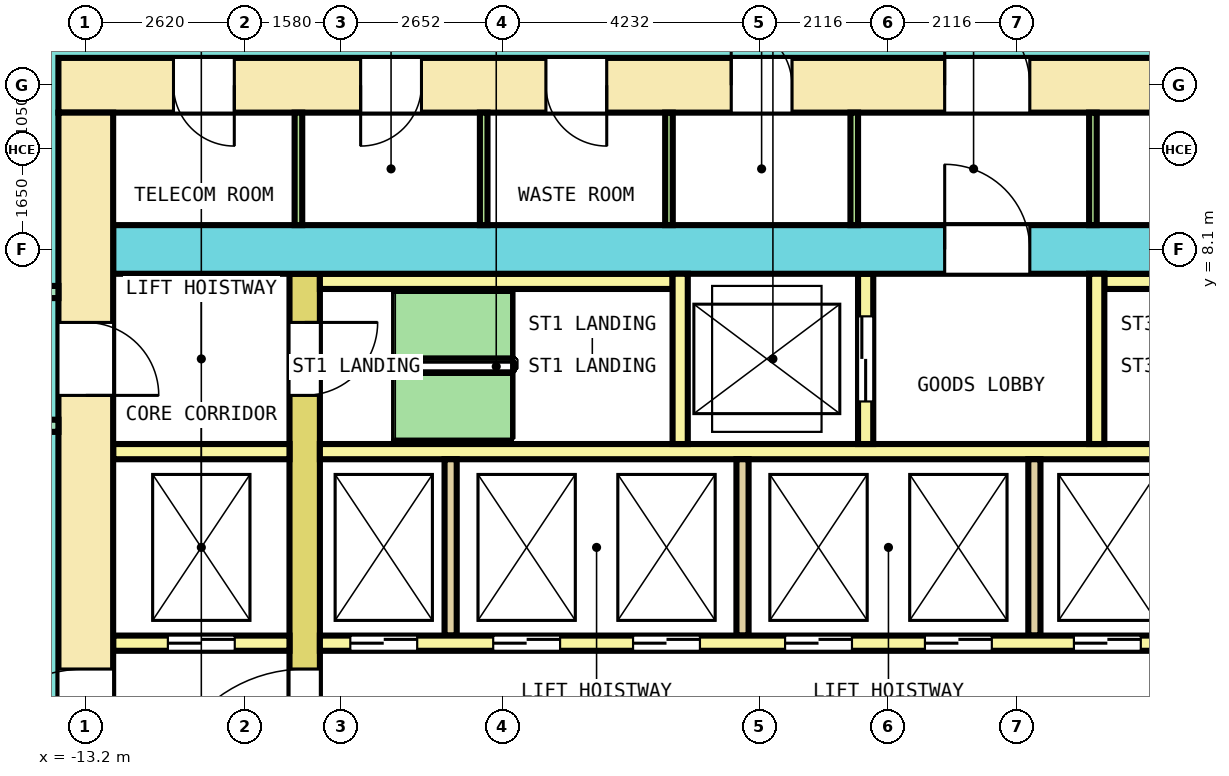
"""IFC4 building model, lengths in metres.
Left out: names, types, materials, properties, quantities, classifications, styles, units other than length and angle.
Written with IfcOpenShell. Run it as: python <this file> out.ifc"""

import sys

from ifc_helpers import new_model, si_unit, direction, frame, frame_2d, origin, place, context, subcontext, project, spatial, rectangle, extrude, element, fill, save


model = new_model("IFC4")
c1 = context("Model", 3, precision=1e-05, world=origin(), true_north=direction((0.0, 1.0)))
c2 = subcontext(c1, "Body", "Model", "MODEL_VIEW")
j1 = project(units=[si_unit("LENGTHUNIT", "METRE"), si_unit("PLANEANGLEUNIT", "RADIAN")], contexts=[c1])
p1 = place(None, origin())
s1 = spatial("IfcSite", under=j1, at=p1, CompositionType="ELEMENT")
p2 = place(p1, origin())
s2 = spatial("IfcBuilding", under=s1, at=p2, CompositionType="ELEMENT")
p3 = place(p2, origin())
s3 = spatial("IfcBuildingStorey", under=s2, at=p3, CompositionType="ELEMENT", Elevation=0.0)
p4 = place(p3, frame((-13.65, 10.8, 0.0), z_axis=(0.0, 0.0, 1.0), x_axis=(1.0, 0.0, 0.0)))
e1 = element("IfcWall", 1, at=p4, inside=s3, PredefinedType="SHEAR", context=c2, shape_type="SweptSolid", body=[
    extrude(rectangle(XDim=27.3, YDim=0.9, at=frame_2d((13.65, 0.0))), origin(), (0.0, 0.0, 1.0), 5.3),
])
p5 = place(p4, frame((1.892, 0.0, 0.0)))
e2 = element("IfcOpeningElement", 2, at=p5, cuts=e1, PredefinedType="OPENING", context=c2, shape_type="SweptSolid", body=[
    extrude(rectangle(XDim=1.0, YDim=2.1, at=frame_2d((0.5, 1.05))), frame((0.0, 0.46, 0.0), z_axis=(0.0, -1.0, 0.0), x_axis=(1.0, 0.0, 0.0)), (0.0, 0.0, 1.0), 0.92),
])
p6 = place(p4, frame((4.97, 0.0, 0.0)))
e3 = element("IfcOpeningElement", 3, at=p6, cuts=e1, PredefinedType="OPENING", context=c2, shape_type="SweptSolid", body=[
    extrude(rectangle(XDim=1.0, YDim=2.1, at=frame_2d((0.5, 1.05))), frame((0.0, 0.46, 0.0), z_axis=(0.0, -1.0, 0.0), x_axis=(1.0, 0.0, 0.0)), (0.0, 0.0, 1.0), 0.92),
])
p7 = place(p4, frame((8.017, 0.0, 0.0)))
e4 = element("IfcOpeningElement", 4, at=p7, cuts=e1, PredefinedType="OPENING", context=c2, shape_type="SweptSolid", body=[
    extrude(rectangle(XDim=1.0, YDim=2.1, at=frame_2d((0.5, 1.05))), frame((0.0, 0.46, 0.0), z_axis=(0.0, -1.0, 0.0), x_axis=(1.0, 0.0, 0.0)), (0.0, 0.0, 1.0), 0.92),
])
p8 = place(p4, frame((11.064, 0.0, 0.0)))
e5 = element("IfcOpeningElement", 5, at=p8, cuts=e1, PredefinedType="OPENING", context=c2, shape_type="SweptSolid", body=[
    extrude(rectangle(XDim=1.0, YDim=2.1, at=frame_2d((0.5, 1.05))), frame((0.0, 0.46, 0.0), z_axis=(0.0, -1.0, 0.0), x_axis=(1.0, 0.0, 0.0)), (0.0, 0.0, 1.0), 0.92),
])
p9 = place(p4, frame((21.238, 0.0, 0.0)))
e6 = element("IfcOpeningElement", 6, at=p9, cuts=e1, PredefinedType="OPENING", context=c2, shape_type="SweptSolid", body=[
    extrude(rectangle(XDim=1.0, YDim=2.1, at=frame_2d((0.5, 1.05))), frame((0.0, 0.46, 0.0), z_axis=(0.0, -1.0, 0.0), x_axis=(1.0, 0.0, 0.0)), (0.0, 0.0, 1.0), 0.92),
])
p10 = place(p4, frame((14.575, 0.0, 0.0)))
e7 = element("IfcOpeningElement", 7, at=p10, cuts=e1, PredefinedType="OPENING", context=c2, shape_type="SweptSolid", body=[
    extrude(rectangle(XDim=1.4, YDim=2.1, at=frame_2d((0.7, 1.05))), frame((0.0, 0.46, 0.0), z_axis=(0.0, -1.0, 0.0), x_axis=(1.0, 0.0, 0.0)), (0.0, 0.0, 1.0), 0.92),
])
p11 = place(p3, frame((-13.2, -10.35, 0.0), z_axis=(0.0, 0.0, 1.0), x_axis=(0.0, 1.0, 0.0)))
e8 = element("IfcWall", 8, at=p11, inside=s3, PredefinedType="SHEAR", context=c2, shape_type="SweptSolid", body=[
    extrude(rectangle(XDim=20.7, YDim=0.9, at=frame_2d((10.35, 0.0))), origin(), (0.0, 0.0, 1.0), 5.3),
])
p12 = place(p11, frame((9.15, 0.0, 0.0)))
e9 = element("IfcOpeningElement", 9, at=p12, cuts=e8, PredefinedType="OPENING", context=c2, shape_type="SweptSolid", body=[
    extrude(rectangle(XDim=2.4, YDim=2.1, at=frame_2d((1.2, 1.05))), frame((0.0, 0.46, 0.0), z_axis=(0.0, -1.0, 0.0), x_axis=(1.0, 0.0, 0.0)), (0.0, 0.0, 1.0), 0.92),
])
p13 = place(p11, frame((16.05, 0.0, 0.0)))
e10 = element("IfcOpeningElement", 10, at=p13, cuts=e8, PredefinedType="OPENING", context=c2, shape_type="SweptSolid", body=[
    extrude(rectangle(XDim=1.2, YDim=2.1, at=frame_2d((0.6, 1.05))), frame((0.0, 0.46, 0.0), z_axis=(0.0, -1.0, 0.0), x_axis=(1.0, 0.0, 0.0)), (0.0, 0.0, 1.0), 0.92),
])
p14 = place(p11, frame((3.45, 0.0, 0.0)))
e11 = element("IfcOpeningElement", 11, at=p14, cuts=e8, PredefinedType="OPENING", context=c2, shape_type="SweptSolid", body=[
    extrude(rectangle(XDim=1.2, YDim=2.1, at=frame_2d((0.6, 1.05))), frame((0.0, 0.46, 0.0), z_axis=(0.0, -1.0, 0.0), x_axis=(1.0, 0.0, 0.0)), (0.0, 0.0, 1.0), 0.92),
])
p15 = place(p3, frame((-12.75, 8.1, 0.0), z_axis=(0.0, 0.0, 1.0), x_axis=(1.0, 0.0, 0.0)))
e12 = element("IfcWall", 12, at=p15, inside=s3, PredefinedType="SHEAR", context=c2, shape_type="SweptSolid", body=[
    extrude(rectangle(XDim=25.5, YDim=0.8, at=frame_2d((12.75, 0.0))), origin(), (0.0, 0.0, 1.0), 5.3),
])
p16 = place(p15, frame((13.675, 0.0, 0.0)))
e13 = element("IfcOpeningElement", 13, at=p16, cuts=e12, PredefinedType="OPENING", context=c2, shape_type="SweptSolid", body=[
    extrude(rectangle(XDim=1.4, YDim=2.1, at=frame_2d((0.7, 1.05))), frame((0.0, 0.41, 0.0), z_axis=(0.0, -1.0, 0.0), x_axis=(1.0, 0.0, 0.0)), (0.0, 0.0, 1.0), 0.82),
])
p17 = place(p3, frame((-9.6, -7.7, 0.0), z_axis=(0.0, 0.0, 1.0), x_axis=(0.0, 1.0, 0.0)))
e14 = element("IfcWall", 14, at=p17, inside=s3, PredefinedType="SHEAR", context=c2, shape_type="SweptSolid", body=[
    extrude(rectangle(XDim=15.4, YDim=0.5, at=frame_2d((7.7, 0.0))), origin(), (0.0, 0.0, 1.0), 5.3),
])
p18 = place(p17, frame((6.5, 0.0, 0.0)))
e15 = element("IfcOpeningElement", 15, at=p18, cuts=e14, PredefinedType="OPENING", context=c2, shape_type="SweptSolid", body=[
    extrude(rectangle(XDim=2.4, YDim=2.1, at=frame_2d((1.2, 1.05))), frame((0.0, 0.26, 0.0), z_axis=(0.0, -1.0, 0.0), x_axis=(1.0, 0.0, 0.0)), (0.0, 0.0, 1.0), 0.52),
])
p19 = place(p17, frame((13.4, 0.0, 0.0)))
e16 = element("IfcOpeningElement", 16, at=p19, cuts=e14, PredefinedType="OPENING", context=c2, shape_type="SweptSolid", body=[
    extrude(rectangle(XDim=1.2, YDim=2.1, at=frame_2d((0.6, 1.05))), frame((0.0, 0.26, 0.0), z_axis=(0.0, -1.0, 0.0), x_axis=(1.0, 0.0, 0.0)), (0.0, 0.0, 1.0), 0.52),
])
p20 = place(p17, frame((0.8, 0.0, 0.0)))
e17 = element("IfcOpeningElement", 17, at=p20, cuts=e14, PredefinedType="OPENING", context=c2, shape_type="SweptSolid", body=[
    extrude(rectangle(XDim=1.2, YDim=2.1, at=frame_2d((0.6, 1.05))), frame((0.0, 0.26, 0.0), z_axis=(0.0, -1.0, 0.0), x_axis=(1.0, 0.0, 0.0)), (0.0, 0.0, 1.0), 0.52),
])
p21 = place(p3, frame((-12.75, 1.625, 0.0), z_axis=(0.0, 0.0, 1.0), x_axis=(1.0, 0.0, 0.0)))
e18 = element("IfcWall", 18, at=p21, inside=s3, PredefinedType="SOLIDWALL", context=c2, shape_type="SweptSolid", body=[
    extrude(rectangle(XDim=2.9, YDim=0.25, at=frame_2d((1.45, 0.0))), origin(), (0.0, 0.0, 1.0), 5.3),
])
p22 = place(p21, frame((0.9, 0.0, 0.0)))
e19 = element("IfcOpeningElement", 19, at=p22, cuts=e18, PredefinedType="OPENING", context=c2, shape_type="SweptSolid", body=[
    extrude(rectangle(XDim=1.1, YDim=2.1, at=frame_2d((0.55, 1.05))), frame((0.0, 0.135, 0.0), z_axis=(0.0, -1.0, 0.0), x_axis=(1.0, 0.0, 0.0)), (0.0, 0.0, 1.0), 0.27),
])
p23 = place(p3, frame((-9.35, 1.625, 0.0), z_axis=(0.0, 0.0, 1.0), x_axis=(1.0, 0.0, 0.0)))
e20 = element("IfcWall", 20, at=p23, inside=s3, PredefinedType="SOLIDWALL", context=c2, shape_type="SweptSolid", body=[
    extrude(rectangle(XDim=18.7, YDim=0.25, at=frame_2d((9.35, 0.0))), origin(), (0.0, 0.0, 1.0), 5.3),
])
p24 = place(p23, frame((0.5, 0.0, 0.0)))
e21 = element("IfcOpeningElement", 21, at=p24, cuts=e20, PredefinedType="OPENING", context=c2, shape_type="SweptSolid", body=[
    extrude(rectangle(XDim=1.1, YDim=2.1, at=frame_2d((0.55, 1.05))), frame((0.0, 0.135, 0.0), z_axis=(0.0, -1.0, 0.0), x_axis=(1.0, 0.0, 0.0)), (0.0, 0.0, 1.0), 0.27),
])
p25 = place(p23, frame((2.85, 0.0, 0.0)))
e22 = element("IfcOpeningElement", 22, at=p25, cuts=e20, PredefinedType="OPENING", context=c2, shape_type="SweptSolid", body=[
    extrude(rectangle(XDim=1.1, YDim=2.1, at=frame_2d((0.55, 1.05))), frame((0.0, 0.135, 0.0), z_axis=(0.0, -1.0, 0.0), x_axis=(1.0, 0.0, 0.0)), (0.0, 0.0, 1.0), 0.27),
])
p26 = place(p23, frame((5.15, 0.0, 0.0)))
e23 = element("IfcOpeningElement", 23, at=p26, cuts=e20, PredefinedType="OPENING", context=c2, shape_type="SweptSolid", body=[
    extrude(rectangle(XDim=1.1, YDim=2.1, at=frame_2d((0.55, 1.05))), frame((0.0, 0.135, 0.0), z_axis=(0.0, -1.0, 0.0), x_axis=(1.0, 0.0, 0.0)), (0.0, 0.0, 1.0), 0.27),
])
p27 = place(p23, frame((7.65, 0.0, 0.0)))
e24 = element("IfcOpeningElement", 24, at=p27, cuts=e20, PredefinedType="OPENING", context=c2, shape_type="SweptSolid", body=[
    extrude(rectangle(XDim=1.1, YDim=2.1, at=frame_2d((0.55, 1.05))), frame((0.0, 0.135, 0.0), z_axis=(0.0, -1.0, 0.0), x_axis=(1.0, 0.0, 0.0)), (0.0, 0.0, 1.0), 0.27),
])
p28 = place(p23, frame((9.95, 0.0, 0.0)))
e25 = element("IfcOpeningElement", 25, at=p28, cuts=e20, PredefinedType="OPENING", context=c2, shape_type="SweptSolid", body=[
    extrude(rectangle(XDim=1.1, YDim=2.1, at=frame_2d((0.55, 1.05))), frame((0.0, 0.135, 0.0), z_axis=(0.0, -1.0, 0.0), x_axis=(1.0, 0.0, 0.0)), (0.0, 0.0, 1.0), 0.27),
])
p29 = place(p23, frame((12.4, 0.0, 0.0)))
e26 = element("IfcOpeningElement", 26, at=p29, cuts=e20, PredefinedType="OPENING", context=c2, shape_type="SweptSolid", body=[
    extrude(rectangle(XDim=1.1, YDim=2.1, at=frame_2d((0.55, 1.05))), frame((0.0, 0.135, 0.0), z_axis=(0.0, -1.0, 0.0), x_axis=(1.0, 0.0, 0.0)), (0.0, 0.0, 1.0), 0.27),
])
p30 = place(p23, frame((14.8, 0.0, 0.0)))
e27 = element("IfcOpeningElement", 27, at=p30, cuts=e20, PredefinedType="OPENING", context=c2, shape_type="SweptSolid", body=[
    extrude(rectangle(XDim=1.1, YDim=2.1, at=frame_2d((0.55, 1.05))), frame((0.0, 0.135, 0.0), z_axis=(0.0, -1.0, 0.0), x_axis=(1.0, 0.0, 0.0)), (0.0, 0.0, 1.0), 0.27),
])
p31 = place(p23, frame((17.1, 0.0, 0.0)))
e28 = element("IfcOpeningElement", 28, at=p31, cuts=e20, PredefinedType="OPENING", context=c2, shape_type="SweptSolid", body=[
    extrude(rectangle(XDim=1.1, YDim=2.1, at=frame_2d((0.55, 1.05))), frame((0.0, 0.135, 0.0), z_axis=(0.0, -1.0, 0.0), x_axis=(1.0, 0.0, 0.0)), (0.0, 0.0, 1.0), 0.27),
])
p32 = place(p3, frame((-12.75, 4.775, 0.0), z_axis=(0.0, 0.0, 1.0), x_axis=(1.0, 0.0, 0.0)))
e29 = element("IfcWall", 29, at=p32, inside=s3, PredefinedType="SOLIDWALL", context=c2, shape_type="SweptSolid", body=[
    extrude(rectangle(XDim=2.9, YDim=0.25, at=frame_2d((1.45, 0.0))), origin(), (0.0, 0.0, 1.0), 5.3),
])
p33 = place(p3, frame((-9.35, 4.775, 0.0), z_axis=(0.0, 0.0, 1.0), x_axis=(1.0, 0.0, 0.0)))
e30 = element("IfcWall", 30, at=p33, inside=s3, PredefinedType="SOLIDWALL", context=c2, shape_type="SweptSolid", body=[
    extrude(rectangle(XDim=18.7, YDim=0.25, at=frame_2d((9.35, 0.0))), origin(), (0.0, 0.0, 1.0), 5.3),
])
for number, where, z_axis, x_axis in (
    (31, (-7.2, 1.75, 0.0), (0.0, 0.0, 1.0), (0.0, 1.0, 0.0)),
    (32, (-2.4, 1.75, 0.0), (0.0, 0.0, 1.0), (0.0, 1.0, 0.0)),
    (33, (2.4, 1.75, 0.0), (0.0, 0.0, 1.0), (0.0, 1.0, 0.0)),
):
    element("IfcWall", number, at=place(p3, frame(where, z_axis=z_axis, x_axis=x_axis)), inside=s3, PredefinedType="SOLIDWALL", context=c2, shape_type="SweptSolid", body=[
        extrude(rectangle(XDim=2.9, YDim=0.2, at=frame_2d((1.45, 0.0))), origin(), (0.0, 0.0, 1.0), 5.3),
    ])
for number, where, z_axis, x_axis in (
    (34, (-9.35, 7.575, 0.0), (0.0, 0.0, 1.0), (1.0, 0.0, 0.0)),
    (35, (3.55, 7.575, 0.0), (0.0, 0.0, 1.0), (1.0, 0.0, 0.0)),
):
    element("IfcWall", number, at=place(p3, frame(where, z_axis=z_axis, x_axis=x_axis)), inside=s3, PredefinedType="SOLIDWALL", context=c2, shape_type="SweptSolid", body=[
        extrude(rectangle(XDim=5.8, YDim=0.25, at=frame_2d((2.9, 0.0))), origin(), (0.0, 0.0, 1.0), 5.3),
    ])
p34 = place(p3, frame((-3.425, 4.9, 0.0), z_axis=(0.0, 0.0, 1.0), x_axis=(0.0, 1.0, 0.0)))
e36 = element("IfcWall", 36, at=p34, inside=s3, PredefinedType="SOLIDWALL", context=c2, shape_type="SweptSolid", body=[
    extrude(rectangle(XDim=2.8, YDim=0.25, at=frame_2d((1.4, 0.0))), origin(), (0.0, 0.0, 1.0), 5.3),
])
p35 = place(p3, frame((-0.375, 4.9, 0.0), z_axis=(0.0, 0.0, 1.0), x_axis=(0.0, 1.0, 0.0)))
e37 = element("IfcWall", 37, at=p35, inside=s3, PredefinedType="SOLIDWALL", context=c2, shape_type="SweptSolid", body=[
    extrude(rectangle(XDim=2.8, YDim=0.25, at=frame_2d((1.4, 0.0))), origin(), (0.0, 0.0, 1.0), 5.3),
])
p36 = place(p35, frame((0.7, 0.0, 0.0)))
e38 = element("IfcOpeningElement", 38, at=p36, cuts=e37, PredefinedType="OPENING", context=c2, shape_type="SweptSolid", body=[
    extrude(rectangle(XDim=1.4, YDim=2.1, at=frame_2d((0.7, 1.05))), frame((0.0, 0.135, 0.0), z_axis=(0.0, -1.0, 0.0), x_axis=(1.0, 0.0, 0.0)), (0.0, 0.0, 1.0), 0.27),
])
p37 = place(p3, frame((3.425, 4.9, 0.0), z_axis=(0.0, 0.0, 1.0), x_axis=(0.0, 1.0, 0.0)))
e39 = element("IfcWall", 39, at=p37, inside=s3, PredefinedType="SOLIDWALL", context=c2, shape_type="SweptSolid", body=[
    extrude(rectangle(XDim=2.8, YDim=0.25, at=frame_2d((1.4, 0.0))), origin(), (0.0, 0.0, 1.0), 5.3),
])
for number, where, z_axis, x_axis in (
    (40, (-9.703, 8.5, 0.0), (0.0, 0.0, 1.0), (0.0, 1.0, 0.0)),
    (41, (-6.656, 8.5, 0.0), (0.0, 0.0, 1.0), (0.0, 1.0, 0.0)),
    (42, (-3.609, 8.5, 0.0), (0.0, 0.0, 1.0), (0.0, 1.0, 0.0)),
    (43, (-0.562, 8.5, 0.0), (0.0, 0.0, 1.0), (0.0, 1.0, 0.0)),
    (44, (3.363, 8.5, 0.0), (0.0, 0.0, 1.0), (0.0, 1.0, 0.0)),
):
    element("IfcWall", number, at=place(p3, frame(where, z_axis=z_axis, x_axis=x_axis)), inside=s3, PredefinedType="PARTITIONING", context=c2, shape_type="SweptSolid", body=[
        extrude(rectangle(XDim=1.85, YDim=0.125, at=frame_2d((0.925, 0.0))), origin(), (0.0, 0.0, 1.0), 5.3),
    ])
p38 = place(p3, frame((-17.727, 7.4, 0.0), z_axis=(0.0, 0.0, 1.0), x_axis=(1.0, 0.0, 0.0)))
e45 = element("IfcWall", 45, at=p38, inside=s3, PredefinedType="PARTITIONING", context=c2, shape_type="SweptSolid", body=[
    extrude(rectangle(XDim=4.077, YDim=0.2, at=frame_2d((2.038, 0.0))), origin(), (0.0, 0.0, 1.0), 4.2),
])
p39 = place(p38, frame((1.977, 0.0, 0.0)))
e46 = element("IfcOpeningElement", 46, at=p39, cuts=e45, PredefinedType="OPENING", context=c2, shape_type="SweptSolid", body=[
    extrude(rectangle(XDim=1.2, YDim=2.1, at=frame_2d((0.6, 1.05))), frame((0.0, 0.11, 0.0), z_axis=(0.0, -1.0, 0.0), x_axis=(1.0, 0.0, 0.0)), (0.0, 0.0, 1.0), 0.22),
])
p40 = place(p3, frame((-16.873, 5.2, 0.0), z_axis=(0.0, 0.0, 1.0), x_axis=(1.0, 0.0, 0.0)))
e47 = element("IfcWall", 47, at=p40, inside=s3, PredefinedType="PARTITIONING", context=c2, shape_type="SweptSolid", body=[
    extrude(rectangle(XDim=3.223, YDim=0.2, at=frame_2d((1.612, 0.0))), origin(), (0.0, 0.0, 1.0), 4.2),
])
p41 = place(p22, origin())
e48 = element("IfcDoor", 48, at=p41, inside=s3, OperationType="DOUBLE_DOOR_SLIDING", PredefinedType="DOOR", context=c2, shape_type="SweptSolid", body=[
    extrude(rectangle(XDim=1.1, YDim=2.1, at=frame_2d((0.55, 1.05))), frame((0.0, 0.075, 0.0), z_axis=(0.0, -1.0, 0.0), x_axis=(1.0, 0.0, 0.0)), (0.0, 0.0, 1.0), 0.15),
])
fill(e19, e48)
p42 = place(p24, origin())
e49 = element("IfcDoor", 49, at=p42, inside=s3, OperationType="DOUBLE_DOOR_SLIDING", PredefinedType="DOOR", context=c2, shape_type="SweptSolid", body=[
    extrude(rectangle(XDim=1.1, YDim=2.1, at=frame_2d((0.55, 1.05))), frame((0.0, 0.075, 0.0), z_axis=(0.0, -1.0, 0.0), x_axis=(1.0, 0.0, 0.0)), (0.0, 0.0, 1.0), 0.15),
])
fill(e21, e49)
p43 = place(p25, origin())
e50 = element("IfcDoor", 50, at=p43, inside=s3, OperationType="DOUBLE_DOOR_SLIDING", PredefinedType="DOOR", context=c2, shape_type="SweptSolid", body=[
    extrude(rectangle(XDim=1.1, YDim=2.1, at=frame_2d((0.55, 1.05))), frame((0.0, 0.075, 0.0), z_axis=(0.0, -1.0, 0.0), x_axis=(1.0, 0.0, 0.0)), (0.0, 0.0, 1.0), 0.15),
])
fill(e22, e50)
p44 = place(p26, origin())
e51 = element("IfcDoor", 51, at=p44, inside=s3, OperationType="DOUBLE_DOOR_SLIDING", PredefinedType="DOOR", context=c2, shape_type="SweptSolid", body=[
    extrude(rectangle(XDim=1.1, YDim=2.1, at=frame_2d((0.55, 1.05))), frame((0.0, 0.075, 0.0), z_axis=(0.0, -1.0, 0.0), x_axis=(1.0, 0.0, 0.0)), (0.0, 0.0, 1.0), 0.15),
])
fill(e23, e51)
p45 = place(p27, origin())
e52 = element("IfcDoor", 52, at=p45, inside=s3, OperationType="DOUBLE_DOOR_SLIDING", PredefinedType="DOOR", context=c2, shape_type="SweptSolid", body=[
    extrude(rectangle(XDim=1.1, YDim=2.1, at=frame_2d((0.55, 1.05))), frame((0.0, 0.075, 0.0), z_axis=(0.0, -1.0, 0.0), x_axis=(1.0, 0.0, 0.0)), (0.0, 0.0, 1.0), 0.15),
])
fill(e24, e52)
p46 = place(p28, origin())
e53 = element("IfcDoor", 53, at=p46, inside=s3, OperationType="DOUBLE_DOOR_SLIDING", PredefinedType="DOOR", context=c2, shape_type="SweptSolid", body=[
    extrude(rectangle(XDim=1.1, YDim=2.1, at=frame_2d((0.55, 1.05))), frame((0.0, 0.075, 0.0), z_axis=(0.0, -1.0, 0.0), x_axis=(1.0, 0.0, 0.0)), (0.0, 0.0, 1.0), 0.15),
])
fill(e25, e53)
p47 = place(p29, origin())
e54 = element("IfcDoor", 54, at=p47, inside=s3, OperationType="DOUBLE_DOOR_SLIDING", PredefinedType="DOOR", context=c2, shape_type="SweptSolid", body=[
    extrude(rectangle(XDim=1.1, YDim=2.1, at=frame_2d((0.55, 1.05))), frame((0.0, 0.075, 0.0), z_axis=(0.0, -1.0, 0.0), x_axis=(1.0, 0.0, 0.0)), (0.0, 0.0, 1.0), 0.15),
])
fill(e26, e54)
p48 = place(p36, origin())
e55 = element("IfcDoor", 55, at=p48, inside=s3, OperationType="DOUBLE_DOOR_SLIDING", PredefinedType="DOOR", context=c2, shape_type="SweptSolid", body=[
    extrude(rectangle(XDim=1.4, YDim=2.1, at=frame_2d((0.7, 1.05))), frame((0.0, 0.075, 0.0), z_axis=(0.0, -1.0, 0.0), x_axis=(1.0, 0.0, 0.0)), (0.0, 0.0, 1.0), 0.15),
])
fill(e38, e55)
p49 = place(p18, origin())
e56 = element("IfcDoor", 56, at=p49, inside=s3, OperationType="DOUBLE_DOOR_SINGLE_SWING", PredefinedType="DOOR", context=c2, shape_type="SweptSolid", body=[
    extrude(rectangle(XDim=2.4, YDim=2.1, at=frame_2d((1.2, 1.05))), frame((0.0, 0.2, 0.0), z_axis=(0.0, -1.0, 0.0), x_axis=(1.0, 0.0, 0.0)), (0.0, 0.0, 1.0), 0.4),
])
fill(e15, e56)
p50 = place(p12, origin())
e57 = element("IfcDoor", 57, at=p50, inside=s3, OperationType="DOUBLE_DOOR_SINGLE_SWING", PredefinedType="DOOR", context=c2, shape_type="SweptSolid", body=[
    extrude(rectangle(XDim=2.4, YDim=2.1, at=frame_2d((1.2, 1.05))), frame((0.0, 0.3, 0.0), z_axis=(0.0, -1.0, 0.0), x_axis=(1.0, 0.0, 0.0)), (0.0, 0.0, 1.0), 0.6),
])
fill(e9, e57)
p51 = place(p19, origin())
e58 = element("IfcDoor", 58, at=p51, inside=s3, OperationType="SINGLE_SWING_LEFT", PredefinedType="DOOR", context=c2, shape_type="SweptSolid", body=[
    extrude(rectangle(XDim=1.2, YDim=2.1, at=frame_2d((0.6, 1.05))), frame((0.0, 0.2, 0.0), z_axis=(0.0, -1.0, 0.0), x_axis=(1.0, 0.0, 0.0)), (0.0, 0.0, 1.0), 0.4),
])
fill(e16, e58)
p52 = place(p13, origin())
e59 = element("IfcDoor", 59, at=p52, inside=s3, OperationType="SINGLE_SWING_RIGHT", PredefinedType="DOOR", context=c2, shape_type="SweptSolid", body=[
    extrude(rectangle(XDim=1.2, YDim=2.1, at=frame_2d((0.6, 1.05))), frame((0.0, 0.3, 0.0), z_axis=(0.0, -1.0, 0.0), x_axis=(1.0, 0.0, 0.0)), (0.0, 0.0, 1.0), 0.6),
])
fill(e10, e59)
p53 = place(p16, origin())
e60 = element("IfcDoor", 60, at=p53, inside=s3, OperationType="DOUBLE_DOOR_SINGLE_SWING", PredefinedType="DOOR", context=c2, shape_type="SweptSolid", body=[
    extrude(rectangle(XDim=1.4, YDim=2.1, at=frame_2d((0.7, 1.05))), frame((0.0, 0.3, 0.0), z_axis=(0.0, -1.0, 0.0), x_axis=(1.0, 0.0, 0.0)), (0.0, 0.0, 1.0), 0.6),
])
fill(e13, e60)
p54 = place(p5, origin())
e61 = element("IfcDoor", 61, at=p54, inside=s3, OperationType="SINGLE_SWING_RIGHT", PredefinedType="DOOR", context=c2, shape_type="SweptSolid", body=[
    extrude(rectangle(XDim=1.0, YDim=2.1, at=frame_2d((0.5, 1.05))), frame((0.0, 0.3, 0.0), z_axis=(0.0, -1.0, 0.0), x_axis=(1.0, 0.0, 0.0)), (0.0, 0.0, 1.0), 0.6),
])
fill(e2, e61)
p55 = place(p6, origin())
e62 = element("IfcDoor", 62, at=p55, inside=s3, OperationType="SINGLE_SWING_LEFT", PredefinedType="DOOR", context=c2, shape_type="SweptSolid", body=[
    extrude(rectangle(XDim=1.0, YDim=2.1, at=frame_2d((0.5, 1.05))), frame((0.0, 0.3, 0.0), z_axis=(0.0, -1.0, 0.0), x_axis=(1.0, 0.0, 0.0)), (0.0, 0.0, 1.0), 0.6),
])
fill(e3, e62)
p56 = place(p7, origin())
e63 = element("IfcDoor", 63, at=p56, inside=s3, OperationType="SINGLE_SWING_RIGHT", PredefinedType="DOOR", context=c2, shape_type="SweptSolid", body=[
    extrude(rectangle(XDim=1.0, YDim=2.1, at=frame_2d((0.5, 1.05))), frame((0.0, 0.3, 0.0), z_axis=(0.0, -1.0, 0.0), x_axis=(1.0, 0.0, 0.0)), (0.0, 0.0, 1.0), 0.6),
])
fill(e4, e63)
p57 = place(p8, origin())
e64 = element("IfcDoor", 64, at=p57, inside=s3, OperationType="SINGLE_SWING_LEFT", PredefinedType="DOOR", context=c2, shape_type="SweptSolid", body=[
    extrude(rectangle(XDim=1.0, YDim=2.1, at=frame_2d((0.5, 1.05))), frame((0.0, 0.3, 0.0), z_axis=(0.0, -1.0, 0.0), x_axis=(1.0, 0.0, 0.0)), (0.0, 0.0, 1.0), 0.6),
])
fill(e5, e64)
p58 = place(p10, origin())
e65 = element("IfcDoor", 65, at=p58, inside=s3, OperationType="DOUBLE_DOOR_SINGLE_SWING", PredefinedType="DOOR", context=c2, shape_type="SweptSolid", body=[
    extrude(rectangle(XDim=1.4, YDim=2.1, at=frame_2d((0.7, 1.05))), frame((0.0, 0.3, 0.0), z_axis=(0.0, -1.0, 0.0), x_axis=(1.0, 0.0, 0.0)), (0.0, 0.0, 1.0), 0.6),
])
fill(e7, e65)
save(model, sys.argv[1])
